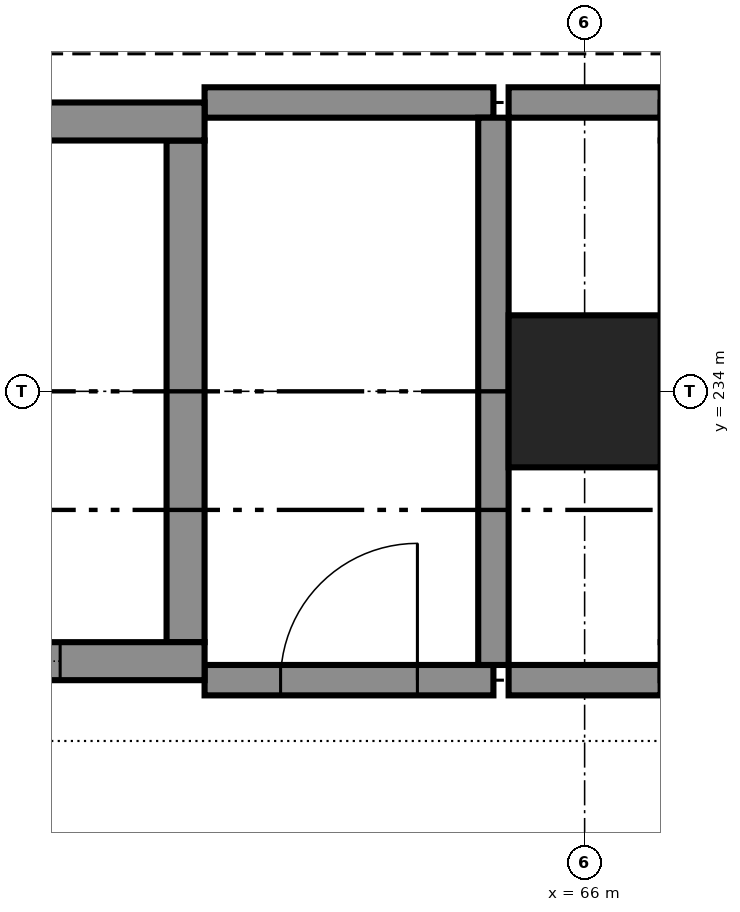
"""IFC4 building model, lengths in metres.
Left out: names, types, materials, properties, quantities, classifications, styles, units other than length and angle.
Written with IfcOpenShell. Run it as: python <this file> out.ifc"""

import sys

from ifc_helpers import new_model, si_unit, direction, frame, frame_2d, origin, origin_2d, place, context, subcontext, project, spatial, rectangle, extrude, element, fill, save


model = new_model("IFC4")
c1 = context("Model", 3, precision=1e-05, world=origin(), true_north=direction((0.0, 1.0)))
c2 = subcontext(c1, "Body", "Model", "MODEL_VIEW")
j1 = project(units=[si_unit("LENGTHUNIT", "METRE"), si_unit("PLANEANGLEUNIT", "RADIAN")], contexts=[c1])
p1 = place(None, origin())
s1 = spatial("IfcSite", under=j1, at=p1, CompositionType="ELEMENT")
p2 = place(p1, origin())
s2 = spatial("IfcBuilding", under=s1, at=p2, CompositionType="ELEMENT")
p3 = place(p2, origin())
s3 = spatial("IfcBuildingStorey", under=s2, at=p3, CompositionType="ELEMENT", Elevation=0.0)
p4 = place(p3, frame((66.0, 234.0, 0.0), z_axis=(0.0, 0.0, 1.0), x_axis=(1.0, 0.0, 0.0)))
e1 = element("IfcColumn", 1, at=p4, inside=s3, PredefinedType="COLUMN", context=c2, shape_type="SweptSolid", body=[
    extrude(rectangle(XDim=1.0, YDim=1.0, at=origin_2d()), origin(), (0.0, 0.0, 1.0), 6.0),
])
p5 = place(p3, frame((60.5, 232.225, 0.0), z_axis=(0.0, 0.0, 1.0), x_axis=(1.0, 0.0, 0.0)))
e2 = element("IfcWall", 2, at=p5, inside=s3, PredefinedType="SHEAR", context=c2, shape_type="SweptSolid", body=[
    extrude(rectangle(XDim=3.0, YDim=0.25, at=frame_2d((1.5, 0.0))), origin(), (0.0, 0.0, 1.0), 6.0),
])
p6 = place(p5, frame((0.95, 0.0, 0.0)))
e3 = element("IfcOpeningElement", 3, at=p6, cuts=e2, PredefinedType="OPENING", context=c2, shape_type="SweptSolid", body=[
    extrude(rectangle(XDim=1.1, YDim=2.1, at=frame_2d((0.55, 1.05))), frame((0.0, 0.135, 0.0), z_axis=(0.0, -1.0, 0.0), x_axis=(1.0, 0.0, 0.0)), (0.0, 0.0, 1.0), 0.27),
])
p7 = place(p3, frame((60.5, 235.775, 0.0), z_axis=(0.0, 0.0, 1.0), x_axis=(1.0, 0.0, 0.0)))
e4 = element("IfcWall", 4, at=p7, inside=s3, PredefinedType="SHEAR", context=c2, shape_type="SweptSolid", body=[
    extrude(rectangle(XDim=3.0, YDim=0.25, at=frame_2d((1.5, 0.0))), origin(), (0.0, 0.0, 1.0), 6.0),
])
p8 = place(p3, frame((63.375, 232.35, 0.0), z_axis=(0.0, 0.0, 1.0), x_axis=(0.0, 1.0, 0.0)))
e5 = element("IfcWall", 5, at=p8, inside=s3, PredefinedType="SHEAR", context=c2, shape_type="SweptSolid", body=[
    extrude(rectangle(XDim=3.3, YDim=0.25, at=frame_2d((1.65, 0.0))), origin(), (0.0, 0.0, 1.0), 6.0),
])
p9 = place(p3, frame((63.5, 232.1, 0.0), z_axis=(0.0, 0.0, 1.0), x_axis=(1.0, 0.0, 0.0)))
e6 = element("IfcWall", 6, at=p9, inside=s3, PredefinedType="PARTITIONING", context=c2, shape_type="SweptSolid", body=[
    extrude(rectangle(XDim=1.9, YDim=0.2, at=frame_2d((0.95, 0.0))), origin(), (0.0, 0.0, 1.0), 5.75),
])
p10 = place(p9, frame((0.5, 0.0, 0.0)))
e7 = element("IfcOpeningElement", 7, at=p10, cuts=e6, PredefinedType="OPENING", context=c2, shape_type="SweptSolid", body=[
    extrude(rectangle(XDim=0.9, YDim=2.1, at=frame_2d((0.45, 1.05))), frame((0.0, 0.11, 0.0), z_axis=(0.0, -1.0, 0.0), x_axis=(1.0, 0.0, 0.0)), (0.0, 0.0, 1.0), 0.22),
])
p11 = place(p3, frame((65.5, 232.1, 0.0), z_axis=(0.0, 0.0, 1.0), x_axis=(1.0, 0.0, 0.0)))
e8 = element("IfcWall", 8, at=p11, inside=s3, PredefinedType="PARTITIONING", context=c2, shape_type="SweptSolid", body=[
    extrude(rectangle(XDim=1.0, YDim=0.2, at=frame_2d((0.5, 0.0))), origin(), (0.0, 0.0, 1.0), 5.75),
])
p12 = place(p3, frame((63.5, 235.9, 0.0), z_axis=(0.0, 0.0, 1.0), x_axis=(1.0, 0.0, 0.0)))
e9 = element("IfcWall", 9, at=p12, inside=s3, PredefinedType="PARTITIONING", context=c2, shape_type="SweptSolid", body=[
    extrude(rectangle(XDim=1.9, YDim=0.2, at=frame_2d((0.95, 0.0))), origin(), (0.0, 0.0, 1.0), 5.75),
])
p13 = place(p3, frame((65.5, 235.9, 0.0), z_axis=(0.0, 0.0, 1.0), x_axis=(1.0, 0.0, 0.0)))
e10 = element("IfcWall", 10, at=p13, inside=s3, PredefinedType="PARTITIONING", context=c2, shape_type="SweptSolid", body=[
    extrude(rectangle(XDim=1.0, YDim=0.2, at=frame_2d((0.5, 0.0))), origin(), (0.0, 0.0, 1.0), 5.75),
])
p14 = place(p3, frame((65.4, 232.2, 0.0), z_axis=(0.0, 0.0, 1.0), x_axis=(0.0, 1.0, 0.0)))
e11 = element("IfcWall", 11, at=p14, inside=s3, PredefinedType="PARTITIONING", context=c2, shape_type="SweptSolid", body=[
    extrude(rectangle(XDim=3.6, YDim=0.2, at=frame_2d((1.8, 0.0))), origin(), (0.0, 0.0, 1.0), 5.75),
])
p15 = place(p10, origin())
e12 = element("IfcDoor", 12, at=p15, inside=s3, OperationType="SINGLE_SWING_RIGHT", PredefinedType="DOOR", context=c2, shape_type="SweptSolid", body=[
    extrude(rectangle(XDim=0.9, YDim=2.1, at=frame_2d((0.45, 1.05))), frame((0.0, 0.025, 0.0), z_axis=(0.0, -1.0, 0.0), x_axis=(1.0, 0.0, 0.0)), (0.0, 0.0, 1.0), 0.05),
])
fill(e7, e12)
p16 = place(p6, origin())
e13 = element("IfcDoor", 13, at=p16, inside=s3, OperationType="SLIDING_TO_LEFT", PredefinedType="DOOR", context=c2, shape_type="SweptSolid", body=[
    extrude(rectangle(XDim=1.1, YDim=2.1, at=frame_2d((0.55, 1.05))), frame((0.0, 0.025, 0.0), z_axis=(0.0, -1.0, 0.0), x_axis=(1.0, 0.0, 0.0)), (0.0, 0.0, 1.0), 0.05),
])
fill(e3, e13)
save(model, sys.argv[1])
